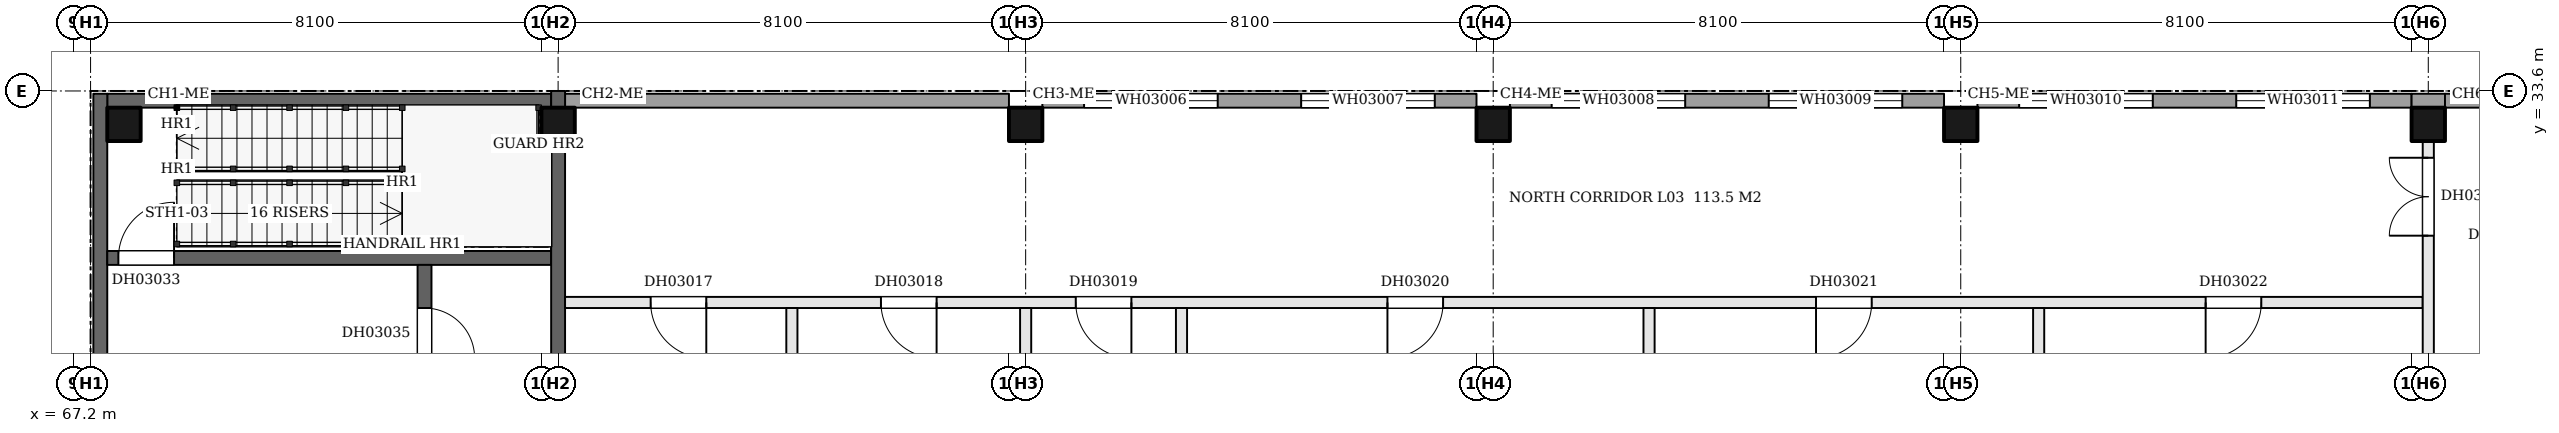
"""IFC4 building model, lengths in metres.
Left out: names, types, materials, properties, quantities, classifications, styles, units other than length and angle.
Written with IfcOpenShell. Run it as: python <this file> out.ifc"""

import sys

from ifc_helpers import new_model, si_unit, direction, frame, frame_2d, origin, origin_2d, place, context, subcontext, project, spatial, rectangle, extrude, element, fill, save


model = new_model("IFC4")
c1 = context("Model", 3, precision=1e-05, world=origin(), true_north=direction((0.0, 1.0)))
c2 = subcontext(c1, "Body", "Model", "MODEL_VIEW")
j1 = project(units=[si_unit("LENGTHUNIT", "METRE"), si_unit("PLANEANGLEUNIT", "RADIAN")], contexts=[c1])
p1 = place(None, origin())
s1 = spatial("IfcSite", under=j1, at=p1, CompositionType="ELEMENT")
p2 = place(p1, origin())
s2 = spatial("IfcBuilding", under=s1, at=p2, CompositionType="ELEMENT")
p3 = place(p2, frame((0.0, 0.0, 19.8)))
s3 = spatial("IfcBuildingStorey", under=s2, at=p3, CompositionType="ELEMENT", Elevation=19.8)
for number, where, z_axis, x_axis in (
    (1, (68.1, 33.0, 0.0), (0.0, 0.0, 1.0), (1.0, 0.0, 0.0)),
    (2, (75.9, 33.0, 0.0), (0.0, 0.0, 1.0), (1.0, 0.0, 0.0)),
    (3, (84.3, 33.0, 0.0), (0.0, 0.0, 1.0), (1.0, 0.0, 0.0)),
    (4, (92.7, 33.0, 0.0), (0.0, 0.0, 1.0), (1.0, 0.0, 0.0)),
    (5, (101.1, 33.0, 0.0), (0.0, 0.0, 1.0), (1.0, 0.0, 0.0)),
    (6, (109.5, 33.0, 0.0), (0.0, 0.0, 1.0), (1.0, 0.0, 0.0)),
):
    element("IfcColumn", number, at=place(p3, frame(where, z_axis=z_axis, x_axis=x_axis)), inside=s3, PredefinedType="COLUMN", context=c2, shape_type="SweptSolid", body=[
        extrude(rectangle(XDim=0.6, YDim=0.6, at=origin_2d()), origin(), (0.0, 0.0, 1.0), 5.0),
    ])
p4 = place(p3, frame((76.025, 29.8, 0.0), z_axis=(0.0, 0.0, 1.0), x_axis=(1.0, 0.0, 0.0)))
e7 = element("IfcWall", 7, at=p4, inside=s3, PredefinedType="PARTITIONING", context=c2, shape_type="SweptSolid", body=[
    extrude(rectangle(XDim=33.375, YDim=0.2, at=frame_2d((16.688, 0.0))), origin(), (0.0, 0.0, 1.0), 5.0),
])
p5 = place(p4, frame((1.538, 0.0, 0.0)))
e8 = element("IfcOpeningElement", 8, at=p5, cuts=e7, PredefinedType="OPENING", context=c2, shape_type="SweptSolid", body=[
    extrude(rectangle(XDim=1.0, YDim=2.1, at=frame_2d((0.5, 1.05))), frame((0.0, 0.11, 0.0), z_axis=(0.0, -1.0, 0.0), x_axis=(1.0, 0.0, 0.0)), (0.0, 0.0, 1.0), 0.22),
])
p6 = place(p4, frame((5.675, 0.0, 0.0)))
e9 = element("IfcOpeningElement", 9, at=p6, cuts=e7, PredefinedType="OPENING", context=c2, shape_type="SweptSolid", body=[
    extrude(rectangle(XDim=1.0, YDim=2.1, at=frame_2d((0.5, 1.05))), frame((0.0, 0.11, 0.0), z_axis=(0.0, -1.0, 0.0), x_axis=(1.0, 0.0, 0.0)), (0.0, 0.0, 1.0), 0.22),
])
p7 = place(p4, frame((9.175, 0.0, 0.0)))
e10 = element("IfcOpeningElement", 10, at=p7, cuts=e7, PredefinedType="OPENING", context=c2, shape_type="SweptSolid", body=[
    extrude(rectangle(XDim=1.0, YDim=2.1, at=frame_2d((0.5, 1.05))), frame((0.0, 0.11, 0.0), z_axis=(0.0, -1.0, 0.0), x_axis=(1.0, 0.0, 0.0)), (0.0, 0.0, 1.0), 0.22),
])
p8 = place(p4, frame((14.775, 0.0, 0.0)))
e11 = element("IfcOpeningElement", 11, at=p8, cuts=e7, PredefinedType="OPENING", context=c2, shape_type="SweptSolid", body=[
    extrude(rectangle(XDim=1.0, YDim=2.1, at=frame_2d((0.5, 1.05))), frame((0.0, 0.11, 0.0), z_axis=(0.0, -1.0, 0.0), x_axis=(1.0, 0.0, 0.0)), (0.0, 0.0, 1.0), 0.22),
])
p9 = place(p4, frame((22.475, 0.0, 0.0)))
e12 = element("IfcOpeningElement", 12, at=p9, cuts=e7, PredefinedType="OPENING", context=c2, shape_type="SweptSolid", body=[
    extrude(rectangle(XDim=1.0, YDim=2.1, at=frame_2d((0.5, 1.05))), frame((0.0, 0.11, 0.0), z_axis=(0.0, -1.0, 0.0), x_axis=(1.0, 0.0, 0.0)), (0.0, 0.0, 1.0), 0.22),
])
p10 = place(p4, frame((29.475, 0.0, 0.0)))
e13 = element("IfcOpeningElement", 13, at=p10, cuts=e7, PredefinedType="OPENING", context=c2, shape_type="SweptSolid", body=[
    extrude(rectangle(XDim=1.0, YDim=2.1, at=frame_2d((0.5, 1.05))), frame((0.0, 0.11, 0.0), z_axis=(0.0, -1.0, 0.0), x_axis=(1.0, 0.0, 0.0)), (0.0, 0.0, 1.0), 0.22),
])
p11 = place(p3, frame((67.8, 30.6, 0.0), z_axis=(0.0, 0.0, 1.0), x_axis=(1.0, 0.0, 0.0)))
e14 = element("IfcWall", 14, at=p11, inside=s3, PredefinedType="SHEAR", context=c2, shape_type="SweptSolid", body=[
    extrude(rectangle(XDim=7.975, YDim=0.25, at=frame_2d((3.987, 0.0))), origin(), (0.0, 0.0, 1.0), 5.0),
])
p12 = place(p11, frame((0.2, 0.0, 0.0)))
e15 = element("IfcOpeningElement", 15, at=p12, cuts=e14, PredefinedType="OPENING", context=c2, shape_type="SweptSolid", body=[
    extrude(rectangle(XDim=1.0, YDim=2.1, at=frame_2d((0.5, 1.05))), frame((0.0, 0.135, 0.0), z_axis=(0.0, -1.0, 0.0), x_axis=(1.0, 0.0, 0.0)), (0.0, 0.0, 1.0), 0.27),
])
p13 = place(p3, frame((67.8, 33.425, 0.0), z_axis=(0.0, 0.0, 1.0), x_axis=(1.0, 0.0, 0.0)))
e16 = element("IfcWall", 16, at=p13, inside=s3, PredefinedType="SHEAR", context=c2, shape_type="SweptSolid", body=[
    extrude(rectangle(XDim=7.975, YDim=0.25, at=frame_2d((3.987, 0.0))), origin(), (0.0, 0.0, 1.0), 5.0),
])
p14 = place(p3, frame((76.025, 33.425, 0.0), z_axis=(0.0, 0.0, 1.0), x_axis=(1.0, 0.0, 0.0)))
e17 = element("IfcWall", 17, at=p14, inside=s3, PredefinedType="SOLIDWALL", context=c2, shape_type="SweptSolid", body=[
    extrude(rectangle(XDim=7.975, YDim=0.25, at=frame_2d((3.988, 0.0))), origin(), (0.0, 0.0, 1.0), 5.0),
])
p15 = place(p3, frame((84.6, 33.425, 0.0), z_axis=(0.0, 0.0, 1.0), x_axis=(1.0, 0.0, 0.0)))
e18 = element("IfcWall", 18, at=p15, inside=s3, PredefinedType="SOLIDWALL", context=c2, shape_type="SweptSolid", body=[
    extrude(rectangle(XDim=7.8, YDim=0.25, at=frame_2d((3.9, 0.0))), origin(), (0.0, 0.0, 1.0), 5.0),
])
p16 = place(p15, frame((0.75, 0.0, 0.9)))
e19 = element("IfcOpeningElement", 19, at=p16, cuts=e18, PredefinedType="OPENING", context=c2, shape_type="SweptSolid", body=[
    extrude(rectangle(XDim=2.4, YDim=1.5, at=frame_2d((1.2, 0.75))), frame((0.0, 0.135, 0.0), z_axis=(0.0, -1.0, 0.0), x_axis=(1.0, 0.0, 0.0)), (0.0, 0.0, 1.0), 0.27),
])
p17 = place(p15, frame((4.65, 0.0, 0.9)))
e20 = element("IfcOpeningElement", 20, at=p17, cuts=e18, PredefinedType="OPENING", context=c2, shape_type="SweptSolid", body=[
    extrude(rectangle(XDim=2.4, YDim=1.5, at=frame_2d((1.2, 0.75))), frame((0.0, 0.135, 0.0), z_axis=(0.0, -1.0, 0.0), x_axis=(1.0, 0.0, 0.0)), (0.0, 0.0, 1.0), 0.27),
])
p18 = place(p3, frame((93.0, 33.425, 0.0), z_axis=(0.0, 0.0, 1.0), x_axis=(1.0, 0.0, 0.0)))
e21 = element("IfcWall", 21, at=p18, inside=s3, PredefinedType="SOLIDWALL", context=c2, shape_type="SweptSolid", body=[
    extrude(rectangle(XDim=7.8, YDim=0.25, at=frame_2d((3.9, 0.0))), origin(), (0.0, 0.0, 1.0), 5.0),
])
p19 = place(p18, frame((0.75, 0.0, 0.9)))
e22 = element("IfcOpeningElement", 22, at=p19, cuts=e21, PredefinedType="OPENING", context=c2, shape_type="SweptSolid", body=[
    extrude(rectangle(XDim=2.4, YDim=1.5, at=frame_2d((1.2, 0.75))), frame((0.0, 0.135, 0.0), z_axis=(0.0, -1.0, 0.0), x_axis=(1.0, 0.0, 0.0)), (0.0, 0.0, 1.0), 0.27),
])
p20 = place(p18, frame((4.65, 0.0, 0.9)))
e23 = element("IfcOpeningElement", 23, at=p20, cuts=e21, PredefinedType="OPENING", context=c2, shape_type="SweptSolid", body=[
    extrude(rectangle(XDim=2.4, YDim=1.5, at=frame_2d((1.2, 0.75))), frame((0.0, 0.135, 0.0), z_axis=(0.0, -1.0, 0.0), x_axis=(1.0, 0.0, 0.0)), (0.0, 0.0, 1.0), 0.27),
])
p21 = place(p3, frame((101.4, 33.425, 0.0), z_axis=(0.0, 0.0, 1.0), x_axis=(1.0, 0.0, 0.0)))
e24 = element("IfcWall", 24, at=p21, inside=s3, PredefinedType="SOLIDWALL", context=c2, shape_type="SweptSolid", body=[
    extrude(rectangle(XDim=7.8, YDim=0.25, at=frame_2d((3.9, 0.0))), origin(), (0.0, 0.0, 1.0), 5.0),
])
p22 = place(p21, frame((0.75, 0.0, 0.9)))
e25 = element("IfcOpeningElement", 25, at=p22, cuts=e24, PredefinedType="OPENING", context=c2, shape_type="SweptSolid", body=[
    extrude(rectangle(XDim=2.4, YDim=1.5, at=frame_2d((1.2, 0.75))), frame((0.0, 0.135, 0.0), z_axis=(0.0, -1.0, 0.0), x_axis=(1.0, 0.0, 0.0)), (0.0, 0.0, 1.0), 0.27),
])
p23 = place(p21, frame((4.65, 0.0, 0.9)))
e26 = element("IfcOpeningElement", 26, at=p23, cuts=e24, PredefinedType="OPENING", context=c2, shape_type="SweptSolid", body=[
    extrude(rectangle(XDim=2.4, YDim=1.5, at=frame_2d((1.2, 0.75))), frame((0.0, 0.135, 0.0), z_axis=(0.0, -1.0, 0.0), x_axis=(1.0, 0.0, 0.0)), (0.0, 0.0, 1.0), 0.27),
])
p24 = place(p3, frame((109.2, 33.425, 0.0), z_axis=(0.0, 0.0, 1.0), x_axis=(1.0, 0.0, 0.0)))
e27 = element("IfcWall", 27, at=p24, inside=s3, PredefinedType="SOLIDWALL", context=c2, shape_type="SweptSolid", body=[
    extrude(rectangle(XDim=0.6, YDim=0.25, at=frame_2d((0.3, 0.0))), origin(), (0.0, 0.0, 1.0), 5.0),
])
p25 = place(p3, frame((109.8, 33.425, 0.0), z_axis=(0.0, 0.0, 1.0), x_axis=(1.0, 0.0, 0.0)))
e28 = element("IfcWall", 28, at=p25, inside=s3, PredefinedType="SOLIDWALL", context=c2, shape_type="SweptSolid", body=[
    extrude(rectangle(XDim=1.775, YDim=0.25, at=frame_2d((0.887, 0.0))), origin(), (0.0, 0.0, 1.0), 5.0),
])
p26 = place(p3, frame((67.675, 25.325, 0.0), z_axis=(0.0, 0.0, 1.0), x_axis=(0.0, 1.0, 0.0)))
e29 = element("IfcWall", 29, at=p26, inside=s3, PredefinedType="SHEAR", context=c2, shape_type="SweptSolid", body=[
    extrude(rectangle(XDim=8.225, YDim=0.25, at=frame_2d((4.113, 0.0))), origin(), (0.0, 0.0, 1.0), 5.0),
])
p27 = place(p3, frame((73.5, 25.325, 0.0), z_axis=(0.0, 0.0, 1.0), x_axis=(0.0, 1.0, 0.0)))
e30 = element("IfcWall", 30, at=p27, inside=s3, PredefinedType="SHEAR", context=c2, shape_type="SweptSolid", body=[
    extrude(rectangle(XDim=5.15, YDim=0.25, at=frame_2d((2.575, 0.0))), origin(), (0.0, 0.0, 1.0), 5.0),
])
p28 = place(p27, frame((0.675, 0.0, 0.0)))
e31 = element("IfcOpeningElement", 31, at=p28, cuts=e30, PredefinedType="OPENING", context=c2, shape_type="SweptSolid", body=[
    extrude(rectangle(XDim=1.1, YDim=2.1, at=frame_2d((0.55, 1.05))), frame((0.0, 0.135, 0.0), z_axis=(0.0, -1.0, 0.0), x_axis=(1.0, 0.0, 0.0)), (0.0, 0.0, 1.0), 0.27),
])
p29 = place(p27, frame((3.475, 0.0, 0.0)))
e32 = element("IfcOpeningElement", 32, at=p29, cuts=e30, PredefinedType="OPENING", context=c2, shape_type="SweptSolid", body=[
    extrude(rectangle(XDim=0.9, YDim=2.1, at=frame_2d((0.45, 1.05))), frame((0.0, 0.135, 0.0), z_axis=(0.0, -1.0, 0.0), x_axis=(1.0, 0.0, 0.0)), (0.0, 0.0, 1.0), 0.27),
])
p30 = place(p3, frame((75.9, 25.5, 0.0), z_axis=(0.0, 0.0, 1.0), x_axis=(0.0, 1.0, 0.0)))
e33 = element("IfcWall", 33, at=p30, inside=s3, PredefinedType="SHEAR", context=c2, shape_type="SweptSolid", body=[
    extrude(rectangle(XDim=7.2, YDim=0.25, at=frame_2d((3.6, 0.0))), origin(), (0.0, 0.0, 1.0), 5.0),
])
p31 = place(p3, frame((75.9, 33.3, 0.0), z_axis=(0.0, 0.0, 1.0), x_axis=(0.0, 1.0, 0.0)))
e34 = element("IfcWall", 34, at=p31, inside=s3, PredefinedType="SHEAR", context=c2, shape_type="SweptSolid", body=[
    extrude(rectangle(XDim=0.3, YDim=0.25, at=frame_2d((0.15, 0.0))), origin(), (0.0, 0.0, 1.0), 5.0),
])
p32 = place(p3, frame((80.1, 25.3, 0.0), z_axis=(0.0, 0.0, 1.0), x_axis=(0.0, 1.0, 0.0)))
e35 = element("IfcWall", 35, at=p32, inside=s3, PredefinedType="PARTITIONING", context=c2, shape_type="SweptSolid", body=[
    extrude(rectangle(XDim=4.4, YDim=0.2, at=frame_2d((2.2, 0.0))), origin(), (0.0, 0.0, 1.0), 5.0),
])
p33 = place(p3, frame((84.3, 25.5, 0.0), z_axis=(0.0, 0.0, 1.0), x_axis=(0.0, 1.0, 0.0)))
e36 = element("IfcWall", 36, at=p33, inside=s3, PredefinedType="PARTITIONING", context=c2, shape_type="SweptSolid", body=[
    extrude(rectangle(XDim=4.2, YDim=0.2, at=frame_2d((2.1, 0.0))), origin(), (0.0, 0.0, 1.0), 5.0),
])
for number, where, z_axis, x_axis in (
    (37, (87.1, 25.3, 0.0), (0.0, 0.0, 1.0), (0.0, 1.0, 0.0)),
    (38, (95.5, 25.3, 0.0), (0.0, 0.0, 1.0), (0.0, 1.0, 0.0)),
    (39, (102.5, 25.3, 0.0), (0.0, 0.0, 1.0), (0.0, 1.0, 0.0)),
):
    element("IfcWall", number, at=place(p3, frame(where, z_axis=z_axis, x_axis=x_axis)), inside=s3, PredefinedType="PARTITIONING", context=c2, shape_type="SweptSolid", body=[
        extrude(rectangle(XDim=4.4, YDim=0.2, at=frame_2d((2.2, 0.0))), origin(), (0.0, 0.0, 1.0), 5.0),
    ])
p34 = place(p3, frame((109.5, 25.5, 0.0), z_axis=(0.0, 0.0, 1.0), x_axis=(0.0, 1.0, 0.0)))
e40 = element("IfcWall", 40, at=p34, inside=s3, PredefinedType="PARTITIONING", context=c2, shape_type="SweptSolid", body=[
    extrude(rectangle(XDim=7.2, YDim=0.2, at=frame_2d((3.6, 0.0))), origin(), (0.0, 0.0, 1.0), 5.0),
])
p35 = place(p34, frame((5.5, 0.0, 0.0)))
e41 = element("IfcOpeningElement", 41, at=p35, cuts=e40, PredefinedType="OPENING", context=c2, shape_type="SweptSolid", body=[
    extrude(rectangle(XDim=1.4, YDim=2.1, at=frame_2d((0.7, 1.05))), frame((0.0, 0.11, 0.0), z_axis=(0.0, -1.0, 0.0), x_axis=(1.0, 0.0, 0.0)), (0.0, 0.0, 1.0), 0.22),
])
p36 = place(p5, frame((1.0, 0.0, 0.0), z_axis=(0.0, 0.0, 1.0), x_axis=(-1.0, 0.0, 0.0)))
e42 = element("IfcDoor", 42, at=p36, inside=s3, OperationType="SINGLE_SWING_LEFT", PredefinedType="DOOR", context=c2, shape_type="SweptSolid", body=[
    extrude(rectangle(XDim=1.0, YDim=2.1, at=frame_2d((0.5, 1.05))), frame((0.0, 0.025, 0.0), z_axis=(0.0, -1.0, 0.0), x_axis=(1.0, 0.0, 0.0)), (0.0, 0.0, 1.0), 0.05),
])
fill(e8, e42)
p37 = place(p6, frame((1.0, 0.0, 0.0), z_axis=(0.0, 0.0, 1.0), x_axis=(-1.0, 0.0, 0.0)))
e43 = element("IfcDoor", 43, at=p37, inside=s3, OperationType="SINGLE_SWING_LEFT", PredefinedType="DOOR", context=c2, shape_type="SweptSolid", body=[
    extrude(rectangle(XDim=1.0, YDim=2.1, at=frame_2d((0.5, 1.05))), frame((0.0, 0.025, 0.0), z_axis=(0.0, -1.0, 0.0), x_axis=(1.0, 0.0, 0.0)), (0.0, 0.0, 1.0), 0.05),
])
fill(e9, e43)
p38 = place(p7, frame((1.0, 0.0, 0.0), z_axis=(0.0, 0.0, 1.0), x_axis=(-1.0, 0.0, 0.0)))
e44 = element("IfcDoor", 44, at=p38, inside=s3, OperationType="SINGLE_SWING_LEFT", PredefinedType="DOOR", context=c2, shape_type="SweptSolid", body=[
    extrude(rectangle(XDim=1.0, YDim=2.1, at=frame_2d((0.5, 1.05))), frame((0.0, 0.025, 0.0), z_axis=(0.0, -1.0, 0.0), x_axis=(1.0, 0.0, 0.0)), (0.0, 0.0, 1.0), 0.05),
])
fill(e10, e44)
p39 = place(p8, frame((1.0, 0.0, 0.0), z_axis=(0.0, 0.0, 1.0), x_axis=(-1.0, 0.0, 0.0)))
e45 = element("IfcDoor", 45, at=p39, inside=s3, OperationType="SINGLE_SWING_RIGHT", PredefinedType="DOOR", context=c2, shape_type="SweptSolid", body=[
    extrude(rectangle(XDim=1.0, YDim=2.1, at=frame_2d((0.5, 1.05))), frame((0.0, 0.025, 0.0), z_axis=(0.0, -1.0, 0.0), x_axis=(1.0, 0.0, 0.0)), (0.0, 0.0, 1.0), 0.05),
])
fill(e11, e45)
p40 = place(p9, frame((1.0, 0.0, 0.0), z_axis=(0.0, 0.0, 1.0), x_axis=(-1.0, 0.0, 0.0)))
e46 = element("IfcDoor", 46, at=p40, inside=s3, OperationType="SINGLE_SWING_RIGHT", PredefinedType="DOOR", context=c2, shape_type="SweptSolid", body=[
    extrude(rectangle(XDim=1.0, YDim=2.1, at=frame_2d((0.5, 1.05))), frame((0.0, 0.025, 0.0), z_axis=(0.0, -1.0, 0.0), x_axis=(1.0, 0.0, 0.0)), (0.0, 0.0, 1.0), 0.05),
])
fill(e12, e46)
p41 = place(p10, frame((1.0, 0.0, 0.0), z_axis=(0.0, 0.0, 1.0), x_axis=(-1.0, 0.0, 0.0)))
e47 = element("IfcDoor", 47, at=p41, inside=s3, OperationType="SINGLE_SWING_RIGHT", PredefinedType="DOOR", context=c2, shape_type="SweptSolid", body=[
    extrude(rectangle(XDim=1.0, YDim=2.1, at=frame_2d((0.5, 1.05))), frame((0.0, 0.025, 0.0), z_axis=(0.0, -1.0, 0.0), x_axis=(1.0, 0.0, 0.0)), (0.0, 0.0, 1.0), 0.05),
])
fill(e13, e47)
p42 = place(p35, origin())
e48 = element("IfcDoor", 48, at=p42, inside=s3, OperationType="DOUBLE_DOOR_SINGLE_SWING", PredefinedType="DOOR", context=c2, shape_type="SweptSolid", body=[
    extrude(rectangle(XDim=1.4, YDim=2.1, at=frame_2d((0.7, 1.05))), frame((0.0, 0.025, 0.0), z_axis=(0.0, -1.0, 0.0), x_axis=(1.0, 0.0, 0.0)), (0.0, 0.0, 1.0), 0.05),
])
fill(e41, e48)
p43 = place(p12, origin())
e49 = element("IfcDoor", 49, at=p43, inside=s3, OperationType="SINGLE_SWING_RIGHT", PredefinedType="DOOR", context=c2, shape_type="SweptSolid", body=[
    extrude(rectangle(XDim=1.0, YDim=2.1, at=frame_2d((0.5, 1.05))), frame((0.0, 0.025, 0.0), z_axis=(0.0, -1.0, 0.0), x_axis=(1.0, 0.0, 0.0)), (0.0, 0.0, 1.0), 0.05),
])
fill(e15, e49)
p44 = place(p29, frame((0.9, 0.0, 0.0), z_axis=(0.0, 0.0, 1.0), x_axis=(-1.0, 0.0, 0.0)))
e50 = element("IfcDoor", 50, at=p44, inside=s3, OperationType="SINGLE_SWING_RIGHT", PredefinedType="DOOR", context=c2, shape_type="SweptSolid", body=[
    extrude(rectangle(XDim=0.9, YDim=2.1, at=frame_2d((0.45, 1.05))), frame((0.0, 0.025, 0.0), z_axis=(0.0, -1.0, 0.0), x_axis=(1.0, 0.0, 0.0)), (0.0, 0.0, 1.0), 0.05),
])
fill(e32, e50)
p45 = place(p16, origin())
e51 = element("IfcWindow", 51, at=p45, inside=s3, PartitioningType="DOUBLE_PANEL_VERTICAL", PredefinedType="WINDOW", context=c2, shape_type="SweptSolid", body=[
    extrude(rectangle(XDim=2.4, YDim=1.5, at=frame_2d((1.2, 0.75))), frame((0.0, 0.03, 0.0), z_axis=(0.0, -1.0, 0.0), x_axis=(1.0, 0.0, 0.0)), (0.0, 0.0, 1.0), 0.06),
])
fill(e19, e51)
p46 = place(p17, origin())
e52 = element("IfcWindow", 52, at=p46, inside=s3, PartitioningType="DOUBLE_PANEL_VERTICAL", PredefinedType="WINDOW", context=c2, shape_type="SweptSolid", body=[
    extrude(rectangle(XDim=2.4, YDim=1.5, at=frame_2d((1.2, 0.75))), frame((0.0, 0.03, 0.0), z_axis=(0.0, -1.0, 0.0), x_axis=(1.0, 0.0, 0.0)), (0.0, 0.0, 1.0), 0.06),
])
fill(e20, e52)
p47 = place(p19, origin())
e53 = element("IfcWindow", 53, at=p47, inside=s3, PartitioningType="DOUBLE_PANEL_VERTICAL", PredefinedType="WINDOW", context=c2, shape_type="SweptSolid", body=[
    extrude(rectangle(XDim=2.4, YDim=1.5, at=frame_2d((1.2, 0.75))), frame((0.0, 0.03, 0.0), z_axis=(0.0, -1.0, 0.0), x_axis=(1.0, 0.0, 0.0)), (0.0, 0.0, 1.0), 0.06),
])
fill(e22, e53)
p48 = place(p20, origin())
e54 = element("IfcWindow", 54, at=p48, inside=s3, PartitioningType="DOUBLE_PANEL_VERTICAL", PredefinedType="WINDOW", context=c2, shape_type="SweptSolid", body=[
    extrude(rectangle(XDim=2.4, YDim=1.5, at=frame_2d((1.2, 0.75))), frame((0.0, 0.03, 0.0), z_axis=(0.0, -1.0, 0.0), x_axis=(1.0, 0.0, 0.0)), (0.0, 0.0, 1.0), 0.06),
])
fill(e23, e54)
p49 = place(p22, origin())
e55 = element("IfcWindow", 55, at=p49, inside=s3, PartitioningType="DOUBLE_PANEL_VERTICAL", PredefinedType="WINDOW", context=c2, shape_type="SweptSolid", body=[
    extrude(rectangle(XDim=2.4, YDim=1.5, at=frame_2d((1.2, 0.75))), frame((0.0, 0.03, 0.0), z_axis=(0.0, -1.0, 0.0), x_axis=(1.0, 0.0, 0.0)), (0.0, 0.0, 1.0), 0.06),
])
fill(e25, e55)
p50 = place(p23, origin())
e56 = element("IfcWindow", 56, at=p50, inside=s3, PartitioningType="DOUBLE_PANEL_VERTICAL", PredefinedType="WINDOW", context=c2, shape_type="SweptSolid", body=[
    extrude(rectangle(XDim=2.4, YDim=1.5, at=frame_2d((1.2, 0.75))), frame((0.0, 0.03, 0.0), z_axis=(0.0, -1.0, 0.0), x_axis=(1.0, 0.0, 0.0)), (0.0, 0.0, 1.0), 0.06),
])
fill(e26, e56)
save(model, sys.argv[1])
